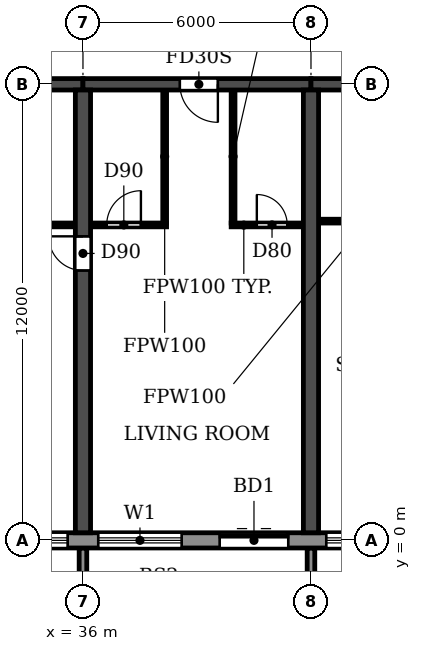
"""IFC4 building model, lengths in metres.
Left out: names, types, materials, properties, quantities, classifications, styles, units other than length and angle.
Written with IfcOpenShell. Run it as: python <this file> out.ifc"""

import sys

from ifc_helpers import new_model, si_unit, direction, frame, frame_2d, origin, place, context, subcontext, project, spatial, polyline, rectangle, outline, extrude, source, transform, mapped, element, fill, save


model = new_model("IFC4")
c1 = context("Model", 3, precision=1e-05, world=origin(), true_north=direction((0.0, 1.0)))
c2 = subcontext(c1, "Body", "Model", "MODEL_VIEW")
j1 = project(units=[si_unit("LENGTHUNIT", "METRE"), si_unit("PLANEANGLEUNIT", "RADIAN")], contexts=[c1])
p1 = place(None, origin())
s1 = spatial("IfcSite", under=j1, at=p1, CompositionType="ELEMENT")
p2 = place(p1, origin())
s2 = spatial("IfcBuilding", under=s1, at=p2, CompositionType="ELEMENT")
p3 = place(p2, frame((0.0, 0.0, 49.8)))
s3 = spatial("IfcBuildingStorey", under=s2, at=p3, CompositionType="ELEMENT", Elevation=49.8)
p4 = place(p3, frame((36.0, 0.2, 0.0), z_axis=(0.0, 0.0, 1.0), x_axis=(0.0, 1.0, 0.0)))
e1 = element("IfcWall", 1, at=p4, inside=s3, PredefinedType="SHEAR", context=c2, shape_type="SweptSolid", body=[
    extrude(rectangle(XDim=11.65, YDim=0.4, at=frame_2d((5.825, 0.0))), origin(), (0.0, 0.0, 1.0), 3.0),
])
p5 = place(p4, frame((6.9, 0.0, 0.0)))
e2 = element("IfcOpeningElement", 2, at=p5, cuts=e1, PredefinedType="OPENING", context=c2, shape_type="SweptSolid", body=[
    extrude(rectangle(XDim=0.9, YDim=2.1, at=frame_2d((0.45, 1.05))), frame((0.0, 0.21, 0.0), z_axis=(0.0, -1.0, 0.0), x_axis=(1.0, 0.0, 0.0)), (0.0, 0.0, 1.0), 0.42),
])
p6 = place(p3, frame((42.0, 0.2, 0.0), z_axis=(0.0, 0.0, 1.0), x_axis=(0.0, 1.0, 0.0)))
e3 = element("IfcWall", 3, at=p6, inside=s3, PredefinedType="SHEAR", context=c2, shape_type="SweptSolid", body=[
    extrude(rectangle(XDim=11.65, YDim=0.4, at=frame_2d((5.825, 0.0))), origin(), (0.0, 0.0, 1.0), 3.0),
])
p7 = place(p3, frame((30.0, 12.0, 0.0), z_axis=(0.0, 0.0, 1.0), x_axis=(1.0, 0.0, 0.0)))
e4 = element("IfcWall", 4, at=p7, inside=s3, PredefinedType="SHEAR", context=c2, shape_type="SweptSolid", body=[
    extrude(rectangle(XDim=6.0, YDim=0.3, at=frame_2d((3.0, 0.0))), origin(), (0.0, 0.0, 1.0), 2.4),
])
p8 = place(p3, frame((36.0, 12.0, 0.0), z_axis=(0.0, 0.0, 1.0), x_axis=(1.0, 0.0, 0.0)))
e5 = element("IfcWall", 5, at=p8, inside=s3, PredefinedType="SHEAR", context=c2, shape_type="SweptSolid", body=[
    extrude(rectangle(XDim=6.0, YDim=0.3, at=frame_2d((3.0, 0.0))), origin(), (0.0, 0.0, 1.0), 2.4),
])
p9 = place(p8, frame((2.55, 0.0, 0.0)))
e6 = element("IfcOpeningElement", 6, at=p9, cuts=e5, PredefinedType="OPENING", context=c2, shape_type="SweptSolid", body=[
    extrude(rectangle(XDim=1.0, YDim=2.1, at=frame_2d((0.5, 1.05))), frame((0.0, 0.16, 0.0), z_axis=(0.0, -1.0, 0.0), x_axis=(1.0, 0.0, 0.0)), (0.0, 0.0, 1.0), 0.32),
])
p10 = place(p3, frame((42.0, 12.0, 0.0), z_axis=(0.0, 0.0, 1.0), x_axis=(1.0, 0.0, 0.0)))
e7 = element("IfcWall", 7, at=p10, inside=s3, PredefinedType="SHEAR", context=c2, shape_type="SweptSolid", body=[
    extrude(rectangle(XDim=6.0, YDim=0.3, at=frame_2d((3.0, 0.0))), origin(), (0.0, 0.0, 1.0), 2.4),
])
p11 = place(p10, frame((2.45, 0.0, 0.0)))
e8 = element("IfcOpeningElement", 8, at=p11, cuts=e7, PredefinedType="OPENING", context=c2, shape_type="SweptSolid", body=[
    extrude(rectangle(XDim=1.0, YDim=2.1, at=frame_2d((0.5, 1.05))), frame((0.0, 0.16, 0.0), z_axis=(0.0, -1.0, 0.0), x_axis=(1.0, 0.0, 0.0)), (0.0, 0.0, 1.0), 0.32),
])
p12 = place(p3, frame((4.683, 0.0, 0.0), z_axis=(0.0, 0.0, 1.0), x_axis=(1.0, 0.0, 0.0)))
e9 = element("IfcWall", 9, at=p12, inside=s3, PredefinedType="STANDARD", context=c2, shape_type="SweptSolid", body=[
    extrude(rectangle(XDim=92.634, YDim=0.4, at=frame_2d((46.317, 0.0))), origin(), (0.0, 0.0, 1.0), 3.0),
])
p13 = place(p12, frame((1.717, 0.0, 0.9)))
e10 = element("IfcOpeningElement", 10, at=p13, cuts=e9, PredefinedType="OPENING", context=c2, shape_type="SweptSolid", body=[
    extrude(rectangle(XDim=2.2, YDim=1.5, at=frame_2d((1.1, 0.75))), frame((0.0, 0.21, 0.0), z_axis=(0.0, -1.0, 0.0), x_axis=(1.0, 0.0, 0.0)), (0.0, 0.0, 1.0), 0.42),
])
p14 = place(p12, frame((4.717, 0.0, 0.9)))
e11 = element("IfcOpeningElement", 11, at=p14, cuts=e9, PredefinedType="OPENING", context=c2, shape_type="SweptSolid", body=[
    extrude(rectangle(XDim=2.2, YDim=1.5, at=frame_2d((1.1, 0.75))), frame((0.0, 0.21, 0.0), z_axis=(0.0, -1.0, 0.0), x_axis=(1.0, 0.0, 0.0)), (0.0, 0.0, 1.0), 0.42),
])
p15 = place(p12, frame((7.717, 0.0, 0.9)))
e12 = element("IfcOpeningElement", 12, at=p15, cuts=e9, PredefinedType="OPENING", context=c2, shape_type="SweptSolid", body=[
    extrude(rectangle(XDim=2.2, YDim=1.5, at=frame_2d((1.1, 0.75))), frame((0.0, 0.21, 0.0), z_axis=(0.0, -1.0, 0.0), x_axis=(1.0, 0.0, 0.0)), (0.0, 0.0, 1.0), 0.42),
])
p16 = place(p12, frame((10.917, 0.0, 0.0)))
e13 = element("IfcOpeningElement", 13, at=p16, cuts=e9, PredefinedType="OPENING", context=c2, shape_type="SweptSolid", body=[
    extrude(rectangle(XDim=1.8, YDim=2.4, at=frame_2d((0.9, 1.2))), frame((0.0, 0.21, 0.0), z_axis=(0.0, -1.0, 0.0), x_axis=(1.0, 0.0, 0.0)), (0.0, 0.0, 1.0), 0.42),
])
p17 = place(p12, frame((13.717, 0.0, 0.9)))
e14 = element("IfcOpeningElement", 14, at=p17, cuts=e9, PredefinedType="OPENING", context=c2, shape_type="SweptSolid", body=[
    extrude(rectangle(XDim=2.2, YDim=1.5, at=frame_2d((1.1, 0.75))), frame((0.0, 0.21, 0.0), z_axis=(0.0, -1.0, 0.0), x_axis=(1.0, 0.0, 0.0)), (0.0, 0.0, 1.0), 0.42),
])
p18 = place(p12, frame((16.717, 0.0, 0.9)))
e15 = element("IfcOpeningElement", 15, at=p18, cuts=e9, PredefinedType="OPENING", context=c2, shape_type="SweptSolid", body=[
    extrude(rectangle(XDim=2.2, YDim=1.5, at=frame_2d((1.1, 0.75))), frame((0.0, 0.21, 0.0), z_axis=(0.0, -1.0, 0.0), x_axis=(1.0, 0.0, 0.0)), (0.0, 0.0, 1.0), 0.42),
])
p19 = place(p12, frame((19.917, 0.0, 0.0)))
e16 = element("IfcOpeningElement", 16, at=p19, cuts=e9, PredefinedType="OPENING", context=c2, shape_type="SweptSolid", body=[
    extrude(rectangle(XDim=1.8, YDim=2.4, at=frame_2d((0.9, 1.2))), frame((0.0, 0.21, 0.0), z_axis=(0.0, -1.0, 0.0), x_axis=(1.0, 0.0, 0.0)), (0.0, 0.0, 1.0), 0.42),
])
p20 = place(p12, frame((22.717, 0.0, 0.9)))
e17 = element("IfcOpeningElement", 17, at=p20, cuts=e9, PredefinedType="OPENING", context=c2, shape_type="SweptSolid", body=[
    extrude(rectangle(XDim=2.2, YDim=1.5, at=frame_2d((1.1, 0.75))), frame((0.0, 0.21, 0.0), z_axis=(0.0, -1.0, 0.0), x_axis=(1.0, 0.0, 0.0)), (0.0, 0.0, 1.0), 0.42),
])
p21 = place(p12, frame((25.717, 0.0, 0.9)))
e18 = element("IfcOpeningElement", 18, at=p21, cuts=e9, PredefinedType="OPENING", context=c2, shape_type="SweptSolid", body=[
    extrude(rectangle(XDim=2.2, YDim=1.5, at=frame_2d((1.1, 0.75))), frame((0.0, 0.21, 0.0), z_axis=(0.0, -1.0, 0.0), x_axis=(1.0, 0.0, 0.0)), (0.0, 0.0, 1.0), 0.42),
])
p22 = place(p12, frame((28.717, 0.0, 0.9)))
e19 = element("IfcOpeningElement", 19, at=p22, cuts=e9, PredefinedType="OPENING", context=c2, shape_type="SweptSolid", body=[
    extrude(rectangle(XDim=2.2, YDim=1.5, at=frame_2d((1.1, 0.75))), frame((0.0, 0.21, 0.0), z_axis=(0.0, -1.0, 0.0), x_axis=(1.0, 0.0, 0.0)), (0.0, 0.0, 1.0), 0.42),
])
p23 = place(p12, frame((31.717, 0.0, 0.9)))
e20 = element("IfcOpeningElement", 20, at=p23, cuts=e9, PredefinedType="OPENING", context=c2, shape_type="SweptSolid", body=[
    extrude(rectangle(XDim=2.2, YDim=1.5, at=frame_2d((1.1, 0.75))), frame((0.0, 0.21, 0.0), z_axis=(0.0, -1.0, 0.0), x_axis=(1.0, 0.0, 0.0)), (0.0, 0.0, 1.0), 0.42),
])
p24 = place(p12, frame((34.917, 0.0, 0.0)))
e21 = element("IfcOpeningElement", 21, at=p24, cuts=e9, PredefinedType="OPENING", context=c2, shape_type="SweptSolid", body=[
    extrude(rectangle(XDim=1.8, YDim=2.4, at=frame_2d((0.9, 1.2))), frame((0.0, 0.21, 0.0), z_axis=(0.0, -1.0, 0.0), x_axis=(1.0, 0.0, 0.0)), (0.0, 0.0, 1.0), 0.42),
])
p25 = place(p12, frame((37.717, 0.0, 0.9)))
e22 = element("IfcOpeningElement", 22, at=p25, cuts=e9, PredefinedType="OPENING", context=c2, shape_type="SweptSolid", body=[
    extrude(rectangle(XDim=2.2, YDim=1.5, at=frame_2d((1.1, 0.75))), frame((0.0, 0.21, 0.0), z_axis=(0.0, -1.0, 0.0), x_axis=(1.0, 0.0, 0.0)), (0.0, 0.0, 1.0), 0.42),
])
p26 = place(p12, frame((40.717, 0.0, 0.9)))
e23 = element("IfcOpeningElement", 23, at=p26, cuts=e9, PredefinedType="OPENING", context=c2, shape_type="SweptSolid", body=[
    extrude(rectangle(XDim=2.2, YDim=1.5, at=frame_2d((1.1, 0.75))), frame((0.0, 0.21, 0.0), z_axis=(0.0, -1.0, 0.0), x_axis=(1.0, 0.0, 0.0)), (0.0, 0.0, 1.0), 0.42),
])
p27 = place(p12, frame((43.717, 0.0, 0.9)))
e24 = element("IfcOpeningElement", 24, at=p27, cuts=e9, PredefinedType="OPENING", context=c2, shape_type="SweptSolid", body=[
    extrude(rectangle(XDim=2.2, YDim=1.5, at=frame_2d((1.1, 0.75))), frame((0.0, 0.21, 0.0), z_axis=(0.0, -1.0, 0.0), x_axis=(1.0, 0.0, 0.0)), (0.0, 0.0, 1.0), 0.42),
])
p28 = place(p12, frame((46.917, 0.0, 0.0)))
e25 = element("IfcOpeningElement", 25, at=p28, cuts=e9, PredefinedType="OPENING", context=c2, shape_type="SweptSolid", body=[
    extrude(rectangle(XDim=1.8, YDim=2.4, at=frame_2d((0.9, 1.2))), frame((0.0, 0.21, 0.0), z_axis=(0.0, -1.0, 0.0), x_axis=(1.0, 0.0, 0.0)), (0.0, 0.0, 1.0), 0.42),
])
p29 = place(p12, frame((49.717, 0.0, 0.9)))
e26 = element("IfcOpeningElement", 26, at=p29, cuts=e9, PredefinedType="OPENING", context=c2, shape_type="SweptSolid", body=[
    extrude(rectangle(XDim=2.2, YDim=1.5, at=frame_2d((1.1, 0.75))), frame((0.0, 0.21, 0.0), z_axis=(0.0, -1.0, 0.0), x_axis=(1.0, 0.0, 0.0)), (0.0, 0.0, 1.0), 0.42),
])
p30 = place(p12, frame((52.717, 0.0, 0.9)))
e27 = element("IfcOpeningElement", 27, at=p30, cuts=e9, PredefinedType="OPENING", context=c2, shape_type="SweptSolid", body=[
    extrude(rectangle(XDim=2.2, YDim=1.5, at=frame_2d((1.1, 0.75))), frame((0.0, 0.21, 0.0), z_axis=(0.0, -1.0, 0.0), x_axis=(1.0, 0.0, 0.0)), (0.0, 0.0, 1.0), 0.42),
])
p31 = place(p12, frame((55.717, 0.0, 0.9)))
e28 = element("IfcOpeningElement", 28, at=p31, cuts=e9, PredefinedType="OPENING", context=c2, shape_type="SweptSolid", body=[
    extrude(rectangle(XDim=2.2, YDim=1.5, at=frame_2d((1.1, 0.75))), frame((0.0, 0.21, 0.0), z_axis=(0.0, -1.0, 0.0), x_axis=(1.0, 0.0, 0.0)), (0.0, 0.0, 1.0), 0.42),
])
p32 = place(p12, frame((58.917, 0.0, 0.0)))
e29 = element("IfcOpeningElement", 29, at=p32, cuts=e9, PredefinedType="OPENING", context=c2, shape_type="SweptSolid", body=[
    extrude(rectangle(XDim=1.8, YDim=2.4, at=frame_2d((0.9, 1.2))), frame((0.0, 0.21, 0.0), z_axis=(0.0, -1.0, 0.0), x_axis=(1.0, 0.0, 0.0)), (0.0, 0.0, 1.0), 0.42),
])
p33 = place(p12, frame((61.717, 0.0, 0.9)))
e30 = element("IfcOpeningElement", 30, at=p33, cuts=e9, PredefinedType="OPENING", context=c2, shape_type="SweptSolid", body=[
    extrude(rectangle(XDim=2.2, YDim=1.5, at=frame_2d((1.1, 0.75))), frame((0.0, 0.21, 0.0), z_axis=(0.0, -1.0, 0.0), x_axis=(1.0, 0.0, 0.0)), (0.0, 0.0, 1.0), 0.42),
])
p34 = place(p12, frame((64.717, 0.0, 0.9)))
e31 = element("IfcOpeningElement", 31, at=p34, cuts=e9, PredefinedType="OPENING", context=c2, shape_type="SweptSolid", body=[
    extrude(rectangle(XDim=2.2, YDim=1.5, at=frame_2d((1.1, 0.75))), frame((0.0, 0.21, 0.0), z_axis=(0.0, -1.0, 0.0), x_axis=(1.0, 0.0, 0.0)), (0.0, 0.0, 1.0), 0.42),
])
p35 = place(p12, frame((67.717, 0.0, 0.9)))
e32 = element("IfcOpeningElement", 32, at=p35, cuts=e9, PredefinedType="OPENING", context=c2, shape_type="SweptSolid", body=[
    extrude(rectangle(XDim=2.2, YDim=1.5, at=frame_2d((1.1, 0.75))), frame((0.0, 0.21, 0.0), z_axis=(0.0, -1.0, 0.0), x_axis=(1.0, 0.0, 0.0)), (0.0, 0.0, 1.0), 0.42),
])
p36 = place(p12, frame((70.917, 0.0, 0.0)))
e33 = element("IfcOpeningElement", 33, at=p36, cuts=e9, PredefinedType="OPENING", context=c2, shape_type="SweptSolid", body=[
    extrude(rectangle(XDim=1.8, YDim=2.4, at=frame_2d((0.9, 1.2))), frame((0.0, 0.21, 0.0), z_axis=(0.0, -1.0, 0.0), x_axis=(1.0, 0.0, 0.0)), (0.0, 0.0, 1.0), 0.42),
])
p37 = place(p12, frame((73.717, 0.0, 0.9)))
e34 = element("IfcOpeningElement", 34, at=p37, cuts=e9, PredefinedType="OPENING", context=c2, shape_type="SweptSolid", body=[
    extrude(rectangle(XDim=2.2, YDim=1.5, at=frame_2d((1.1, 0.75))), frame((0.0, 0.21, 0.0), z_axis=(0.0, -1.0, 0.0), x_axis=(1.0, 0.0, 0.0)), (0.0, 0.0, 1.0), 0.42),
])
p38 = place(p12, frame((76.717, 0.0, 0.9)))
e35 = element("IfcOpeningElement", 35, at=p38, cuts=e9, PredefinedType="OPENING", context=c2, shape_type="SweptSolid", body=[
    extrude(rectangle(XDim=2.2, YDim=1.5, at=frame_2d((1.1, 0.75))), frame((0.0, 0.21, 0.0), z_axis=(0.0, -1.0, 0.0), x_axis=(1.0, 0.0, 0.0)), (0.0, 0.0, 1.0), 0.42),
])
p39 = place(p12, frame((79.717, 0.0, 0.9)))
e36 = element("IfcOpeningElement", 36, at=p39, cuts=e9, PredefinedType="OPENING", context=c2, shape_type="SweptSolid", body=[
    extrude(rectangle(XDim=2.2, YDim=1.5, at=frame_2d((1.1, 0.75))), frame((0.0, 0.21, 0.0), z_axis=(0.0, -1.0, 0.0), x_axis=(1.0, 0.0, 0.0)), (0.0, 0.0, 1.0), 0.42),
])
p40 = place(p12, frame((82.917, 0.0, 0.0)))
e37 = element("IfcOpeningElement", 37, at=p40, cuts=e9, PredefinedType="OPENING", context=c2, shape_type="SweptSolid", body=[
    extrude(rectangle(XDim=1.8, YDim=2.4, at=frame_2d((0.9, 1.2))), frame((0.0, 0.21, 0.0), z_axis=(0.0, -1.0, 0.0), x_axis=(1.0, 0.0, 0.0)), (0.0, 0.0, 1.0), 0.42),
])
p41 = place(p12, frame((85.717, 0.0, 0.9)))
e38 = element("IfcOpeningElement", 38, at=p41, cuts=e9, PredefinedType="OPENING", context=c2, shape_type="SweptSolid", body=[
    extrude(rectangle(XDim=2.2, YDim=1.5, at=frame_2d((1.1, 0.75))), frame((0.0, 0.21, 0.0), z_axis=(0.0, -1.0, 0.0), x_axis=(1.0, 0.0, 0.0)), (0.0, 0.0, 1.0), 0.42),
])
p42 = place(p12, frame((88.717, 0.0, 0.9)))
e39 = element("IfcOpeningElement", 39, at=p42, cuts=e9, PredefinedType="OPENING", context=c2, shape_type="SweptSolid", body=[
    extrude(rectangle(XDim=2.2, YDim=1.5, at=frame_2d((1.1, 0.75))), frame((0.0, 0.21, 0.0), z_axis=(0.0, -1.0, 0.0), x_axis=(1.0, 0.0, 0.0)), (0.0, 0.0, 1.0), 0.42),
])
m1 = source(origin(), c2, "Body", "SweptSolid", [
    extrude(outline(polyline([(0.0, 0.0), (0.2, 0.0), (0.2, 1.65), (0.0, 1.65), (0.0, 0.0)])), origin(), (0.0, 0.0, 1.0), 3.1),
])
for number, where in (
    (40, (35.9, -1.85, 0.0)),
    (41, (41.9, -1.85, 0.0)),
):
    element("IfcWall", number, at=place(p3, frame(where)), inside=s3, PredefinedType="STANDARD", context=c2, shape_type="MappedRepresentation", body=[
        mapped(m1, transform((0.0, 0.0, 0.0))),
    ])
p43 = place(p3, frame((33.1, 8.3, 0.0), z_axis=(0.0, 0.0, 1.0), x_axis=(1.0, 0.0, 0.0)))
e42 = element("IfcWall", 42, at=p43, inside=s3, PredefinedType="PARTITIONING", context=c2, shape_type="SweptSolid", body=[
    extrude(rectangle(XDim=2.69, YDim=0.1, at=frame_2d((1.345, 0.0))), origin(), (0.0, 0.0, 1.0), 3.0),
])
p44 = place(p43, frame((1.0, 0.0, 0.0)))
e43 = element("IfcOpeningElement", 43, at=p44, cuts=e42, PredefinedType="OPENING", context=c2, shape_type="SweptSolid", body=[
    extrude(rectangle(XDim=0.8, YDim=2.1, at=frame_2d((0.4, 1.05))), frame((0.0, 0.06, 0.0), z_axis=(0.0, -1.0, 0.0), x_axis=(1.0, 0.0, 0.0)), (0.0, 0.0, 1.0), 0.12),
])
p45 = place(p3, frame((36.21, 8.3, 0.0), z_axis=(0.0, 0.0, 1.0), x_axis=(1.0, 0.0, 0.0)))
e44 = element("IfcWall", 44, at=p45, inside=s3, PredefinedType="PARTITIONING", context=c2, shape_type="SweptSolid", body=[
    extrude(rectangle(XDim=1.99, YDim=0.1, at=frame_2d((0.995, 0.0))), origin(), (0.0, 0.0, 1.0), 3.0),
])
p46 = place(p45, frame((0.415, 0.0, 0.0)))
e45 = element("IfcOpeningElement", 45, at=p46, cuts=e44, PredefinedType="OPENING", context=c2, shape_type="SweptSolid", body=[
    extrude(rectangle(XDim=0.9, YDim=2.1, at=frame_2d((0.45, 1.05))), frame((0.0, 0.06, 0.0), z_axis=(0.0, -1.0, 0.0), x_axis=(1.0, 0.0, 0.0)), (0.0, 0.0, 1.0), 0.12),
])
p47 = place(p3, frame((39.9, 8.3, 0.0), z_axis=(0.0, 0.0, 1.0), x_axis=(1.0, 0.0, 0.0)))
e46 = element("IfcWall", 46, at=p47, inside=s3, PredefinedType="PARTITIONING", context=c2, shape_type="SweptSolid", body=[
    extrude(rectangle(XDim=1.89, YDim=0.1, at=frame_2d((0.945, 0.0))), origin(), (0.0, 0.0, 1.0), 3.0),
])
p48 = place(p47, frame((0.675, 0.0, 0.0)))
e47 = element("IfcOpeningElement", 47, at=p48, cuts=e46, PredefinedType="OPENING", context=c2, shape_type="SweptSolid", body=[
    extrude(rectangle(XDim=0.8, YDim=2.1, at=frame_2d((0.4, 1.05))), frame((0.0, 0.06, 0.0), z_axis=(0.0, -1.0, 0.0), x_axis=(1.0, 0.0, 0.0)), (0.0, 0.0, 1.0), 0.12),
])
p49 = place(p3, frame((42.21, 8.4, 0.0), z_axis=(0.0, 0.0, 1.0), x_axis=(1.0, 0.0, 0.0)))
e48 = element("IfcWall", 48, at=p49, inside=s3, PredefinedType="PARTITIONING", context=c2, shape_type="SweptSolid", body=[
    extrude(rectangle(XDim=1.89, YDim=0.1, at=frame_2d((0.945, 0.0))), origin(), (0.0, 0.0, 1.0), 3.0),
])
for number, where, z_axis, x_axis in (
    (49, (38.15, 8.35, 0.0), (0.0, 0.0, 1.0), (0.0, 1.0, 0.0)),
    (50, (39.95, 8.35, 0.0), (0.0, 0.0, 1.0), (0.0, 1.0, 0.0)),
):
    element("IfcWall", number, at=place(p3, frame(where, z_axis=z_axis, x_axis=x_axis)), inside=s3, PredefinedType="PARTITIONING", context=c2, shape_type="SweptSolid", body=[
        extrude(rectangle(XDim=3.49, YDim=0.1, at=frame_2d((1.745, 0.0))), origin(), (0.0, 0.0, 1.0), 3.0),
    ])
p50 = place(p22, origin())
e51 = element("IfcWindow", 51, at=p50, inside=s3, PartitioningType="DOUBLE_PANEL_HORIZONTAL", PredefinedType="WINDOW", context=c2, shape_type="SweptSolid", body=[
    extrude(rectangle(XDim=2.2, YDim=1.5, at=frame_2d((1.1, 0.75))), frame((0.0, 0.03, 0.0), z_axis=(0.0, -1.0, 0.0), x_axis=(1.0, 0.0, 0.0)), (0.0, 0.0, 1.0), 0.06),
])
fill(e19, e51)
p51 = place(p23, origin())
e52 = element("IfcWindow", 52, at=p51, inside=s3, PartitioningType="DOUBLE_PANEL_HORIZONTAL", PredefinedType="WINDOW", context=c2, shape_type="SweptSolid", body=[
    extrude(rectangle(XDim=2.2, YDim=1.5, at=frame_2d((1.1, 0.75))), frame((0.0, 0.03, 0.0), z_axis=(0.0, -1.0, 0.0), x_axis=(1.0, 0.0, 0.0)), (0.0, 0.0, 1.0), 0.06),
])
fill(e20, e52)
p52 = place(p24, origin())
e53 = element("IfcDoor", 53, at=p52, inside=s3, OperationType="DOUBLE_DOOR_SLIDING", PredefinedType="DOOR", context=c2, shape_type="SweptSolid", body=[
    extrude(rectangle(XDim=1.8, YDim=2.4, at=frame_2d((0.9, 1.2))), frame((0.0, 0.025, 0.0), z_axis=(0.0, -1.0, 0.0), x_axis=(1.0, 0.0, 0.0)), (0.0, 0.0, 1.0), 0.05),
])
fill(e21, e53)
p53 = place(p25, origin())
e54 = element("IfcWindow", 54, at=p53, inside=s3, PartitioningType="DOUBLE_PANEL_HORIZONTAL", PredefinedType="WINDOW", context=c2, shape_type="SweptSolid", body=[
    extrude(rectangle(XDim=2.2, YDim=1.5, at=frame_2d((1.1, 0.75))), frame((0.0, 0.03, 0.0), z_axis=(0.0, -1.0, 0.0), x_axis=(1.0, 0.0, 0.0)), (0.0, 0.0, 1.0), 0.06),
])
fill(e22, e54)
p54 = place(p5, origin())
e55 = element("IfcDoor", 55, at=p54, inside=s3, OperationType="SINGLE_SWING_RIGHT", PredefinedType="DOOR", context=c2, shape_type="SweptSolid", body=[
    extrude(rectangle(XDim=0.9, YDim=2.1, at=frame_2d((0.45, 1.05))), frame((0.0, 0.025, 0.0), z_axis=(0.0, -1.0, 0.0), x_axis=(1.0, 0.0, 0.0)), (0.0, 0.0, 1.0), 0.05),
])
fill(e2, e55)
p55 = place(p46, origin())
e56 = element("IfcDoor", 56, at=p55, inside=s3, OperationType="SINGLE_SWING_RIGHT", PredefinedType="DOOR", context=c2, shape_type="SweptSolid", body=[
    extrude(rectangle(XDim=0.9, YDim=2.1, at=frame_2d((0.45, 1.05))), frame((0.0, 0.025, 0.0), z_axis=(0.0, -1.0, 0.0), x_axis=(1.0, 0.0, 0.0)), (0.0, 0.0, 1.0), 0.05),
])
fill(e45, e56)
p56 = place(p9, frame((1.0, 0.0, 0.0), z_axis=(0.0, 0.0, 1.0), x_axis=(-1.0, 0.0, 0.0)))
e57 = element("IfcDoor", 57, at=p56, inside=s3, OperationType="SINGLE_SWING_LEFT", PredefinedType="DOOR", context=c2, shape_type="SweptSolid", body=[
    extrude(rectangle(XDim=1.0, YDim=2.1, at=frame_2d((0.5, 1.05))), frame((0.0, 0.025, 0.0), z_axis=(0.0, -1.0, 0.0), x_axis=(1.0, 0.0, 0.0)), (0.0, 0.0, 1.0), 0.05),
])
fill(e6, e57)
p57 = place(p48, origin())
e58 = element("IfcDoor", 58, at=p57, inside=s3, OperationType="SINGLE_SWING_LEFT", PredefinedType="DOOR", context=c2, shape_type="SweptSolid", body=[
    extrude(rectangle(XDim=0.8, YDim=2.1, at=frame_2d((0.4, 1.05))), frame((0.0, 0.025, 0.0), z_axis=(0.0, -1.0, 0.0), x_axis=(1.0, 0.0, 0.0)), (0.0, 0.0, 1.0), 0.05),
])
fill(e47, e58)
save(model, sys.argv[1])
